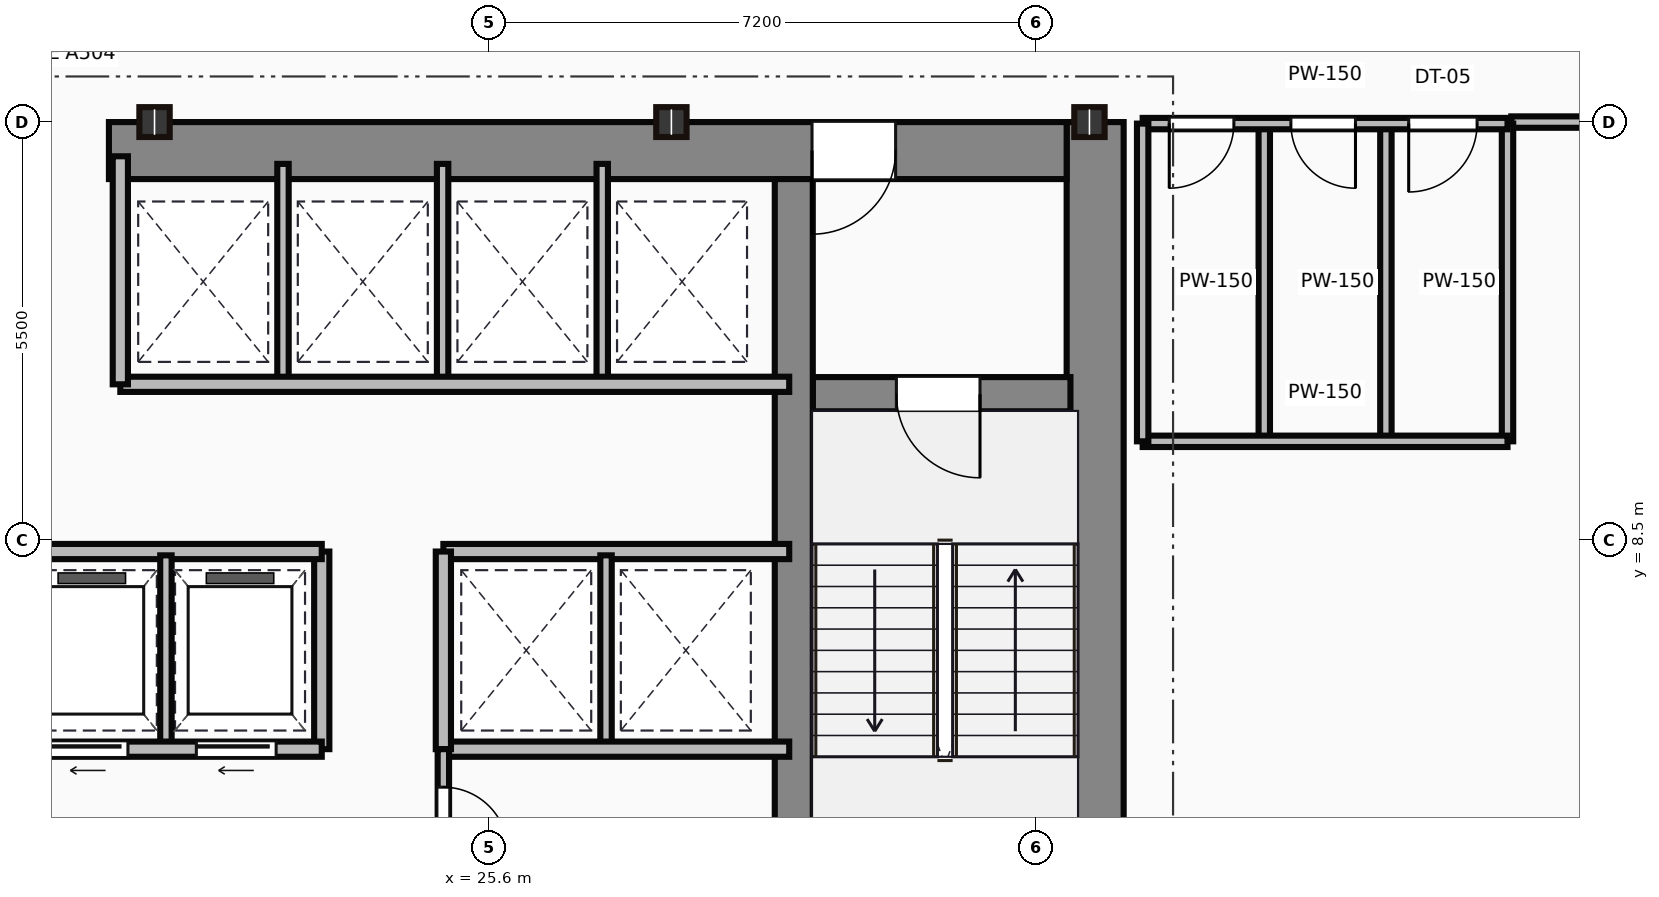
"""IFC4 building model, lengths in metres.
Left out: names, types, materials, properties, quantities, classifications, styles, units other than length and angle.
Written with IfcOpenShell. Run it as: python <this file> out.ifc"""

import sys

from ifc_helpers import new_model, si_unit, direction, frame, frame_2d, origin, origin_2d, place, context, subcontext, project, spatial, rectangle, i_section, extrude, source, transform, mapped, element, fill, save


model = new_model("IFC4")
c1 = context("Model", 3, precision=1e-05, world=origin(), true_north=direction((0.0, 1.0)))
c2 = subcontext(c1, "Body", "Model", "MODEL_VIEW")
j1 = project(units=[si_unit("LENGTHUNIT", "METRE"), si_unit("PLANEANGLEUNIT", "RADIAN")], contexts=[c1])
p1 = place(None, origin())
s1 = spatial("IfcSite", under=j1, at=p1, CompositionType="ELEMENT")
p2 = place(p1, origin())
s2 = spatial("IfcBuilding", under=s1, at=p2, CompositionType="ELEMENT")
p3 = place(p2, frame((0.0, 0.0, 88.65)))
s3 = spatial("IfcBuildingStorey", under=s2, at=p3, CompositionType="ELEMENT", Elevation=88.65)
m1 = source(origin(), c2, "Body", "SweptSolid", [
    extrude(rectangle(XDim=13.1, YDim=0.75, at=frame_2d((6.55, 0.0))), origin(), (0.0, 0.0, 1.0), 3.65),
])
p4 = place(p3, frame((33.575, 0.9, 0.0), z_axis=(0.0, 0.0, 1.0), x_axis=(0.0, 1.0, 0.0)))
e1 = element("IfcWall", 1, at=p4, inside=s3, PredefinedType="SHEAR", context=c2, shape_type="MappedRepresentation", body=[
    mapped(m1, transform((0.0, 0.0, 0.0))),
])
m2 = source(origin(), c2, "Body", "SweptSolid", [
    extrude(rectangle(XDim=12.6, YDim=0.75, at=frame_2d((6.3, 0.0))), origin(), (0.0, 0.0, 1.0), 3.65),
])
p5 = place(p3, frame((20.6, 13.625, 0.0), z_axis=(0.0, 0.0, 1.0), x_axis=(1.0, 0.0, 0.0)))
e2 = element("IfcWall", 2, at=p5, inside=s3, PredefinedType="SHEAR", context=c2, shape_type="MappedRepresentation", body=[
    mapped(m2, transform((0.0, 0.0, 0.0))),
])
p6 = place(p5, frame((9.25, 0.0, 0.0)))
e3 = element("IfcOpeningElement", 3, at=p6, cuts=e2, PredefinedType="OPENING", context=c2, shape_type="SweptSolid", body=[
    extrude(rectangle(XDim=1.1, YDim=2.15, at=frame_2d((0.55, 1.075))), frame((0.0, 0.385, 0.0), z_axis=(0.0, -1.0, 0.0), x_axis=(1.0, 0.0, 0.0)), (0.0, 0.0, 1.0), 0.77),
])
m3 = source(origin(), c2, "Body", "SweptSolid", [
    extrude(rectangle(XDim=12.35, YDim=0.5, at=frame_2d((6.175, 0.0))), origin(), (0.0, 0.0, 1.0), 3.65),
])
p7 = place(p3, frame((29.61, 0.9, 0.0), z_axis=(0.0, 0.0, 1.0), x_axis=(0.0, 1.0, 0.0)))
e4 = element("IfcWall", 4, at=p7, inside=s3, PredefinedType="SHEAR", context=c2, shape_type="MappedRepresentation", body=[
    mapped(m3, transform((0.0, 0.0, 0.0))),
])
m4 = source(origin(), c2, "Body", "SweptSolid", [
    extrude(rectangle(XDim=3.39, YDim=0.45, at=frame_2d((1.695, 0.0))), origin(), (0.0, 0.0, 1.0), 3.65),
])
p8 = place(p3, frame((29.86, 10.42, 0.0), z_axis=(0.0, 0.0, 1.0), x_axis=(1.0, 0.0, 0.0)))
e5 = element("IfcWall", 5, at=p8, inside=s3, PredefinedType="SHEAR", context=c2, shape_type="MappedRepresentation", body=[
    mapped(m4, transform((0.0, 0.0, 0.0))),
])
p9 = place(p8, frame((1.1, 0.0, 0.0)))
e6 = element("IfcOpeningElement", 6, at=p9, cuts=e5, PredefinedType="OPENING", context=c2, shape_type="SweptSolid", body=[
    extrude(rectangle(XDim=1.1, YDim=2.15, at=frame_2d((0.55, 1.075))), frame((0.0, 0.235, 0.0), z_axis=(0.0, -1.0, 0.0), x_axis=(1.0, 0.0, 0.0)), (0.0, 0.0, 1.0), 0.47),
])
m5 = source(origin(), c2, "Body", "SweptSolid", [
    extrude(i_section(OverallWidth=0.399, OverallDepth=0.393, WebThickness=0.023, FlangeThickness=0.037, at=origin_2d()), origin(), (0.0, 0.0, 1.0), 3.65),
])
for number, where, z_axis, x_axis in (
    (7, (21.2, 14.0, 0.0), (0.0, 0.0, 1.0), (1.0, 0.0, 0.0)),
    (8, (28.0, 14.0, 0.0), (0.0, 0.0, 1.0), (1.0, 0.0, 0.0)),
    (9, (33.5, 14.0, 0.0), (0.0, 0.0, 1.0), (1.0, 0.0, 0.0)),
):
    element("IfcColumn", number, at=place(p3, frame(where, z_axis=z_axis, x_axis=x_axis)), inside=s3, PredefinedType="COLUMN", context=c2, shape_type="MappedRepresentation", body=[
        mapped(m5, transform((0.0, 0.0, 0.0))),
    ])
m6 = source(origin(), c2, "Body", "SweptSolid", [
    extrude(rectangle(XDim=11.85, YDim=0.2, at=frame_2d((5.925, 0.0))), origin(), (0.0, 0.0, 1.0), 3.4),
])
p10 = place(p3, frame((11.55, 5.75, 0.0), z_axis=(0.0, 0.0, 1.0), x_axis=(1.0, 0.0, 0.0)))
e10 = element("IfcWall", 10, at=p10, inside=s3, PredefinedType="PARTITIONING", context=c2, shape_type="MappedRepresentation", body=[
    mapped(m6, transform((0.0, 0.0, 0.0))),
])
p11 = place(p10, frame((0.45, 0.0, 0.0)))
e11 = element("IfcOpeningElement", 11, at=p11, cuts=e10, PredefinedType="OPENING", context=c2, shape_type="SweptSolid", body=[
    extrude(rectangle(XDim=1.05, YDim=2.15, at=frame_2d((0.525, 1.075))), frame((0.0, 0.11, 0.0), z_axis=(0.0, -1.0, 0.0), x_axis=(1.0, 0.0, 0.0)), (0.0, 0.0, 1.0), 0.22),
])
p12 = place(p10, frame((2.4, 0.0, 0.0)))
e12 = element("IfcOpeningElement", 12, at=p12, cuts=e10, PredefinedType="OPENING", context=c2, shape_type="SweptSolid", body=[
    extrude(rectangle(XDim=1.05, YDim=2.15, at=frame_2d((0.525, 1.075))), frame((0.0, 0.11, 0.0), z_axis=(0.0, -1.0, 0.0), x_axis=(1.0, 0.0, 0.0)), (0.0, 0.0, 1.0), 0.22),
])
p13 = place(p10, frame((4.35, 0.0, 0.0)))
e13 = element("IfcOpeningElement", 13, at=p13, cuts=e10, PredefinedType="OPENING", context=c2, shape_type="SweptSolid", body=[
    extrude(rectangle(XDim=1.05, YDim=2.15, at=frame_2d((0.525, 1.075))), frame((0.0, 0.11, 0.0), z_axis=(0.0, -1.0, 0.0), x_axis=(1.0, 0.0, 0.0)), (0.0, 0.0, 1.0), 0.22),
])
p14 = place(p10, frame((6.3, 0.0, 0.0)))
e14 = element("IfcOpeningElement", 14, at=p14, cuts=e10, PredefinedType="OPENING", context=c2, shape_type="SweptSolid", body=[
    extrude(rectangle(XDim=1.05, YDim=2.15, at=frame_2d((0.525, 1.075))), frame((0.0, 0.11, 0.0), z_axis=(0.0, -1.0, 0.0), x_axis=(1.0, 0.0, 0.0)), (0.0, 0.0, 1.0), 0.22),
])
p15 = place(p10, frame((8.25, 0.0, 0.0)))
e15 = element("IfcOpeningElement", 15, at=p15, cuts=e10, PredefinedType="OPENING", context=c2, shape_type="SweptSolid", body=[
    extrude(rectangle(XDim=1.05, YDim=2.15, at=frame_2d((0.525, 1.075))), frame((0.0, 0.11, 0.0), z_axis=(0.0, -1.0, 0.0), x_axis=(1.0, 0.0, 0.0)), (0.0, 0.0, 1.0), 0.22),
])
p16 = place(p10, frame((10.2, 0.0, 0.0)))
e16 = element("IfcOpeningElement", 16, at=p16, cuts=e10, PredefinedType="OPENING", context=c2, shape_type="SweptSolid", body=[
    extrude(rectangle(XDim=1.05, YDim=2.15, at=frame_2d((0.525, 1.075))), frame((0.0, 0.11, 0.0), z_axis=(0.0, -1.0, 0.0), x_axis=(1.0, 0.0, 0.0)), (0.0, 0.0, 1.0), 0.22),
])
p17 = place(p3, frame((11.55, 8.35, 0.0), z_axis=(0.0, 0.0, 1.0), x_axis=(1.0, 0.0, 0.0)))
e17 = element("IfcWall", 17, at=p17, inside=s3, PredefinedType="PARTITIONING", context=c2, shape_type="MappedRepresentation", body=[
    mapped(m6, transform((0.0, 0.0, 0.0))),
])
m7 = source(origin(), c2, "Body", "SweptSolid", [
    extrude(rectangle(XDim=2.6, YDim=0.2, at=frame_2d((1.3, 0.0))), origin(), (0.0, 0.0, 1.0), 3.4),
])
p18 = place(p3, frame((23.4, 5.75, 0.0), z_axis=(0.0, 0.0, 1.0), x_axis=(0.0, 1.0, 0.0)))
e18 = element("IfcWall", 18, at=p18, inside=s3, PredefinedType="PARTITIONING", context=c2, shape_type="MappedRepresentation", body=[
    mapped(m7, transform((0.0, 0.0, 0.0))),
])
m8 = source(origin(), c2, "Body", "SweptSolid", [
    extrude(rectangle(XDim=2.5, YDim=0.15, at=frame_2d((1.25, 0.0))), origin(), (0.0, 0.0, 1.0), 3.4),
])
p19 = place(p3, frame((21.35, 5.8, 0.0), z_axis=(0.0, 0.0, 1.0), x_axis=(0.0, 1.0, 0.0)))
e19 = element("IfcWall", 19, at=p19, inside=s3, PredefinedType="PARTITIONING", context=c2, shape_type="MappedRepresentation", body=[
    mapped(m8, transform((0.0, 0.0, 0.0))),
])
m9 = source(origin(), c2, "Body", "SweptSolid", [
    extrude(rectangle(XDim=8.8, YDim=0.2, at=frame_2d((4.4, 0.0))), origin(), (0.0, 0.0, 1.0), 3.4),
])
p20 = place(p3, frame((20.75, 10.55, 0.0), z_axis=(0.0, 0.0, 1.0), x_axis=(1.0, 0.0, 0.0)))
e20 = element("IfcWall", 20, at=p20, inside=s3, PredefinedType="PARTITIONING", context=c2, shape_type="MappedRepresentation", body=[
    mapped(m9, transform((0.0, 0.0, 0.0))),
])
m10 = source(origin(), c2, "Body", "SweptSolid", [
    extrude(rectangle(XDim=3.0, YDim=0.2, at=frame_2d((1.5, 0.0))), origin(), (0.0, 0.0, 1.0), 3.4),
])
p21 = place(p3, frame((20.75, 10.55, 0.0), z_axis=(0.0, 0.0, 1.0), x_axis=(0.0, 1.0, 0.0)))
e21 = element("IfcWall", 21, at=p21, inside=s3, PredefinedType="PARTITIONING", context=c2, shape_type="MappedRepresentation", body=[
    mapped(m10, transform((0.0, 0.0, 0.0))),
])
m11 = source(origin(), c2, "Body", "SweptSolid", [
    extrude(rectangle(XDim=2.85, YDim=0.15, at=frame_2d((1.425, 0.0))), origin(), (0.0, 0.0, 1.0), 3.4),
])
for number, where, z_axis, x_axis in (
    (22, (22.89, 10.6, 0.0), (0.0, 0.0, 1.0), (0.0, 1.0, 0.0)),
    (23, (24.99, 10.6, 0.0), (0.0, 0.0, 1.0), (0.0, 1.0, 0.0)),
    (24, (27.09, 10.6, 0.0), (0.0, 0.0, 1.0), (0.0, 1.0, 0.0)),
):
    element("IfcWall", number, at=place(p3, frame(where, z_axis=z_axis, x_axis=x_axis)), inside=s3, PredefinedType="PARTITIONING", context=c2, shape_type="MappedRepresentation", body=[
        mapped(m11, transform((0.0, 0.0, 0.0))),
    ])
m12 = source(origin(), c2, "Body", "SweptSolid", [
    extrude(rectangle(XDim=4.55, YDim=0.2, at=frame_2d((2.275, 0.0))), origin(), (0.0, 0.0, 1.0), 3.4),
])
for number, where, z_axis, x_axis in (
    (25, (25.0, 8.35, 0.0), (0.0, 0.0, 1.0), (1.0, 0.0, 0.0)),
    (26, (25.0, 5.75, 0.0), (0.0, 0.0, 1.0), (1.0, 0.0, 0.0)),
):
    element("IfcWall", number, at=place(p3, frame(where, z_axis=z_axis, x_axis=x_axis)), inside=s3, PredefinedType="PARTITIONING", context=c2, shape_type="MappedRepresentation", body=[
        mapped(m12, transform((0.0, 0.0, 0.0))),
    ])
p22 = place(p3, frame((25.0, 5.75, 0.0), z_axis=(0.0, 0.0, 1.0), x_axis=(0.0, 1.0, 0.0)))
e27 = element("IfcWall", 27, at=p22, inside=s3, PredefinedType="PARTITIONING", context=c2, shape_type="MappedRepresentation", body=[
    mapped(m7, transform((0.0, 0.0, 0.0))),
])
p23 = place(p3, frame((27.14, 5.8, 0.0), z_axis=(0.0, 0.0, 1.0), x_axis=(0.0, 1.0, 0.0)))
e28 = element("IfcWall", 28, at=p23, inside=s3, PredefinedType="PARTITIONING", context=c2, shape_type="MappedRepresentation", body=[
    mapped(m8, transform((0.0, 0.0, 0.0))),
])
m13 = source(origin(), c2, "Body", "SweptSolid", [
    extrude(rectangle(XDim=4.9, YDim=0.15, at=frame_2d((2.45, 0.0))), origin(), (0.0, 0.0, 1.0), 3.4),
])
p24 = place(p3, frame((25.0, 0.85, 0.0), z_axis=(0.0, 0.0, 1.0), x_axis=(0.0, 1.0, 0.0)))
e29 = element("IfcWall", 29, at=p24, inside=s3, PredefinedType="PARTITIONING", context=c2, shape_type="MappedRepresentation", body=[
    mapped(m13, transform((0.0, 0.0, 0.0))),
])
p25 = place(p24, frame((1.85, 0.0, 0.0)))
e30 = element("IfcOpeningElement", 30, at=p25, cuts=e29, PredefinedType="OPENING", context=c2, shape_type="SweptSolid", body=[
    extrude(rectangle(XDim=0.95, YDim=2.15, at=frame_2d((0.475, 1.075))), frame((0.0, 0.085, 0.0), z_axis=(0.0, -1.0, 0.0), x_axis=(1.0, 0.0, 0.0)), (0.0, 0.0, 1.0), 0.17),
])
p26 = place(p24, frame((3.55, 0.0, 0.0)))
e31 = element("IfcOpeningElement", 31, at=p26, cuts=e29, PredefinedType="OPENING", context=c2, shape_type="SweptSolid", body=[
    extrude(rectangle(XDim=0.85, YDim=2.15, at=frame_2d((0.425, 1.075))), frame((0.0, 0.085, 0.0), z_axis=(0.0, -1.0, 0.0), x_axis=(1.0, 0.0, 0.0)), (0.0, 0.0, 1.0), 0.17),
])
m14 = source(origin(), c2, "Body", "SweptSolid", [
    extrude(rectangle(XDim=4.8, YDim=0.15, at=frame_2d((2.4, 0.0))), origin(), (0.0, 0.0, 1.0), 2.702),
])
p27 = place(p3, frame((34.2, 13.98, 0.0), z_axis=(0.0, 0.0, 1.0), x_axis=(1.0, 0.0, 0.0)))
e32 = element("IfcWall", 32, at=p27, inside=s3, PredefinedType="PARTITIONING", context=c2, shape_type="MappedRepresentation", body=[
    mapped(m14, transform((0.0, 0.0, 0.0))),
])
p28 = place(p27, frame((0.35, 0.0, 0.0)))
e33 = element("IfcOpeningElement", 33, at=p28, cuts=e32, PredefinedType="OPENING", context=c2, shape_type="SweptSolid", body=[
    extrude(rectangle(XDim=0.85, YDim=2.1, at=frame_2d((0.425, 1.05))), frame((0.0, 0.085, 0.0), z_axis=(0.0, -1.0, 0.0), x_axis=(1.0, 0.0, 0.0)), (0.0, 0.0, 1.0), 0.17),
])
p29 = place(p27, frame((1.95, 0.0, 0.0)))
e34 = element("IfcOpeningElement", 34, at=p29, cuts=e32, PredefinedType="OPENING", context=c2, shape_type="SweptSolid", body=[
    extrude(rectangle(XDim=0.85, YDim=2.1, at=frame_2d((0.425, 1.05))), frame((0.0, 0.085, 0.0), z_axis=(0.0, -1.0, 0.0), x_axis=(1.0, 0.0, 0.0)), (0.0, 0.0, 1.0), 0.17),
])
p30 = place(p27, frame((3.5, 0.0, 0.0)))
e35 = element("IfcOpeningElement", 35, at=p30, cuts=e32, PredefinedType="OPENING", context=c2, shape_type="SweptSolid", body=[
    extrude(rectangle(XDim=0.9, YDim=2.1, at=frame_2d((0.45, 1.05))), frame((0.0, 0.085, 0.0), z_axis=(0.0, -1.0, 0.0), x_axis=(1.0, 0.0, 0.0)), (0.0, 0.0, 1.0), 0.17),
])
m15 = source(origin(), c2, "Body", "SweptSolid", [
    extrude(rectangle(XDim=4.8, YDim=0.15, at=frame_2d((2.4, 0.0))), origin(), (0.0, 0.0, 1.0), 3.4),
])
p31 = place(p3, frame((34.2, 9.8, 0.0), z_axis=(0.0, 0.0, 1.0), x_axis=(1.0, 0.0, 0.0)))
e36 = element("IfcWall", 36, at=p31, inside=s3, PredefinedType="PARTITIONING", context=c2, shape_type="MappedRepresentation", body=[
    mapped(m15, transform((0.0, 0.0, 0.0))),
])
m16 = source(origin(), c2, "Body", "SweptSolid", [
    extrude(rectangle(XDim=4.18, YDim=0.15, at=frame_2d((2.09, 0.0))), origin(), (0.0, 0.0, 1.0), 3.4),
])
for number, where, z_axis, x_axis in (
    (37, (39.0, 9.8, 0.0), (0.0, 0.0, 1.0), (0.0, 1.0, 0.0)),
    (38, (34.2, 9.8, 0.0), (0.0, 0.0, 1.0), (0.0, 1.0, 0.0)),
    (39, (35.8, 9.8, 0.0), (0.0, 0.0, 1.0), (0.0, 1.0, 0.0)),
    (40, (37.4, 9.8, 0.0), (0.0, 0.0, 1.0), (0.0, 1.0, 0.0)),
):
    element("IfcWall", number, at=place(p3, frame(where, z_axis=z_axis, x_axis=x_axis)), inside=s3, PredefinedType="PARTITIONING", context=c2, shape_type="MappedRepresentation", body=[
        mapped(m16, transform((0.0, 0.0, 0.0))),
    ])
m17 = source(origin(), c2, "Body", "SweptSolid", [
    extrude(rectangle(XDim=1.75, YDim=0.15, at=frame_2d((0.875, 0.0))), origin(), (0.0, 0.0, 1.0), 2.702),
])
p32 = place(p3, frame((40.8, 14.0, 0.0), z_axis=(0.0, 0.0, 1.0), x_axis=(-1.0, 0.0, 0.0)))
e41 = element("IfcWall", 41, at=p32, inside=s3, PredefinedType="PARTITIONING", context=c2, shape_type="MappedRepresentation", body=[
    mapped(m17, transform((0.0, 0.0, 0.0))),
])
m18 = source(origin(), c2, "Body", "SweptSolid", [
    extrude(rectangle(XDim=1.1, YDim=2.15, at=frame_2d((0.55, 1.075))), frame((0.0, 0.025, 0.0), z_axis=(0.0, -1.0, 0.0), x_axis=(1.0, 0.0, 0.0)), (0.0, 0.0, 1.0), 0.05),
])
p33 = place(p9, frame((1.1, 0.0, 0.0), z_axis=(0.0, 0.0, 1.0), x_axis=(-1.0, 0.0, 0.0)))
e42 = element("IfcDoor", 42, at=p33, inside=s3, OperationType="SINGLE_SWING_RIGHT", PredefinedType="DOOR", context=c2, shape_type="MappedRepresentation", body=[
    mapped(m18, transform((0.0, 0.0, 0.0))),
])
fill(e6, e42)
p34 = place(p6, origin())
e43 = element("IfcDoor", 43, at=p34, inside=s3, OperationType="SINGLE_SWING_LEFT", PredefinedType="DOOR", context=c2, shape_type="MappedRepresentation", body=[
    mapped(m18, transform((0.0, 0.0, 0.0))),
])
fill(e3, e43)
m19 = source(origin(), c2, "Body", "SweptSolid", [
    extrude(rectangle(XDim=1.05, YDim=2.15, at=frame_2d((0.525, 1.075))), frame((0.0, 0.025, 0.0), z_axis=(0.0, -1.0, 0.0), x_axis=(1.0, 0.0, 0.0)), (0.0, 0.0, 1.0), 0.05),
])
p35 = place(p15, frame((1.05, 0.0, 0.0), z_axis=(0.0, 0.0, 1.0), x_axis=(-1.0, 0.0, 0.0)))
e44 = element("IfcDoor", 44, at=p35, inside=s3, OperationType="SLIDING_TO_LEFT", PredefinedType="DOOR", context=c2, shape_type="MappedRepresentation", body=[
    mapped(m19, transform((0.0, 0.0, 0.0))),
])
fill(e15, e44)
p36 = place(p16, frame((1.05, 0.0, 0.0), z_axis=(0.0, 0.0, 1.0), x_axis=(-1.0, 0.0, 0.0)))
e45 = element("IfcDoor", 45, at=p36, inside=s3, OperationType="SLIDING_TO_LEFT", PredefinedType="DOOR", context=c2, shape_type="MappedRepresentation", body=[
    mapped(m19, transform((0.0, 0.0, 0.0))),
])
fill(e16, e45)
m20 = source(origin(), c2, "Body", "SweptSolid", [
    extrude(rectangle(XDim=0.85, YDim=2.15, at=frame_2d((0.425, 1.075))), frame((0.0, 0.025, 0.0), z_axis=(0.0, -1.0, 0.0), x_axis=(1.0, 0.0, 0.0)), (0.0, 0.0, 1.0), 0.05),
])
p37 = place(p26, origin())
e46 = element("IfcDoor", 46, at=p37, inside=s3, OperationType="SINGLE_SWING_LEFT", PredefinedType="DOOR", context=c2, shape_type="MappedRepresentation", body=[
    mapped(m20, transform((0.0, 0.0, 0.0))),
])
fill(e31, e46)
m21 = source(origin(), c2, "Body", "SweptSolid", [
    extrude(rectangle(XDim=0.85, YDim=2.1, at=frame_2d((0.425, 1.05))), frame((0.0, 0.025, 0.0), z_axis=(0.0, -1.0, 0.0), x_axis=(1.0, 0.0, 0.0)), (0.0, 0.0, 1.0), 0.05),
])
p38 = place(p28, frame((0.85, 0.0, 0.0), z_axis=(0.0, 0.0, 1.0), x_axis=(-1.0, 0.0, 0.0)))
e47 = element("IfcDoor", 47, at=p38, inside=s3, OperationType="SINGLE_SWING_LEFT", PredefinedType="DOOR", context=c2, shape_type="MappedRepresentation", body=[
    mapped(m21, transform((0.0, 0.0, 0.0))),
])
fill(e33, e47)
p39 = place(p29, frame((0.85, 0.0, 0.0), z_axis=(0.0, 0.0, 1.0), x_axis=(-1.0, 0.0, 0.0)))
e48 = element("IfcDoor", 48, at=p39, inside=s3, OperationType="SINGLE_SWING_RIGHT", PredefinedType="DOOR", context=c2, shape_type="MappedRepresentation", body=[
    mapped(m21, transform((0.0, 0.0, 0.0))),
])
fill(e34, e48)
m22 = source(origin(), c2, "Body", "SweptSolid", [
    extrude(rectangle(XDim=0.9, YDim=2.1, at=frame_2d((0.45, 1.05))), frame((0.0, 0.025, 0.0), z_axis=(0.0, -1.0, 0.0), x_axis=(1.0, 0.0, 0.0)), (0.0, 0.0, 1.0), 0.05),
])
p40 = place(p30, frame((0.9, 0.0, 0.0), z_axis=(0.0, 0.0, 1.0), x_axis=(-1.0, 0.0, 0.0)))
e49 = element("IfcDoor", 49, at=p40, inside=s3, OperationType="SINGLE_SWING_LEFT", PredefinedType="DOOR", context=c2, shape_type="MappedRepresentation", body=[
    mapped(m22, transform((0.0, 0.0, 0.0))),
])
fill(e35, e49)
save(model, sys.argv[1])
